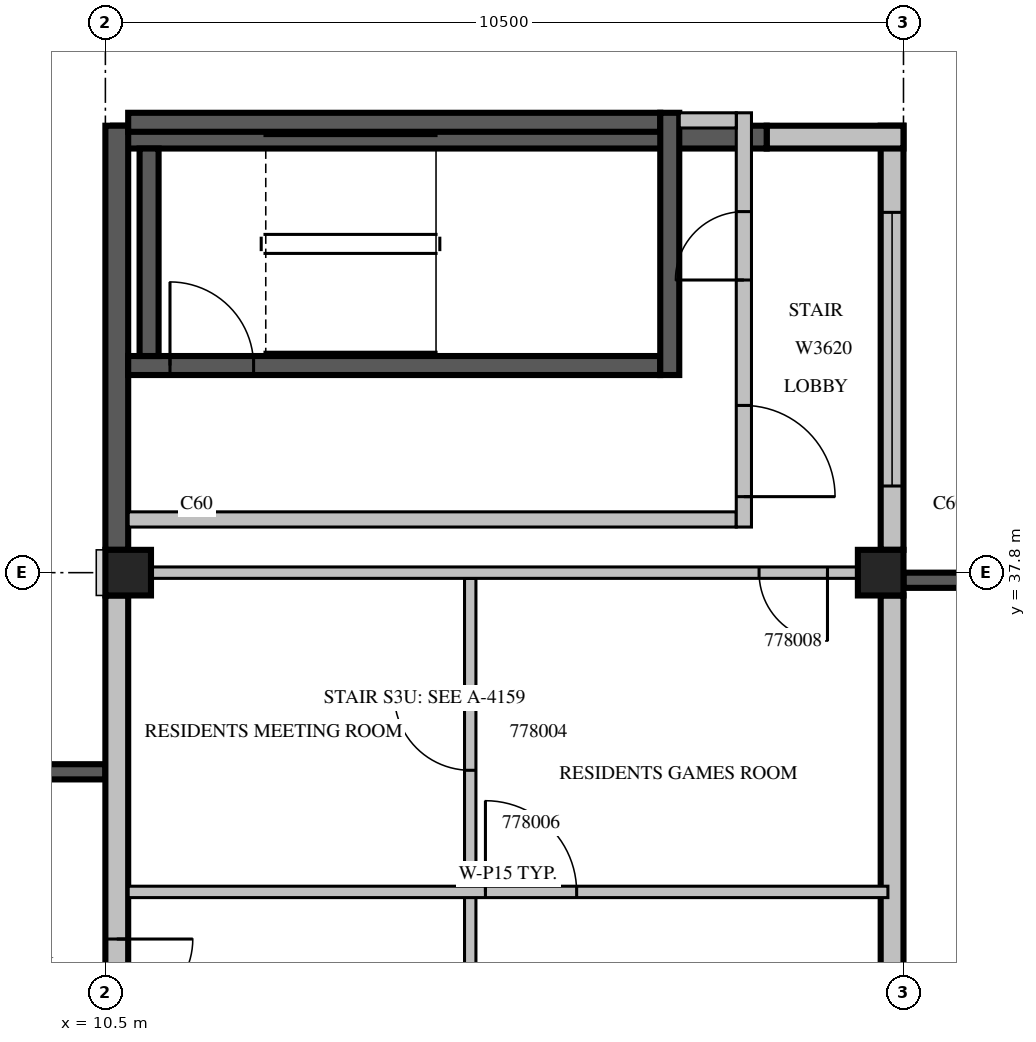
"""IFC4 building model, lengths in metres.
Left out: names, types, materials, properties, quantities, classifications, styles, units other than length and angle.
Written with IfcOpenShell. Run it as: python <this file> out.ifc"""

import sys

from ifc_helpers import new_model, si_unit, direction, frame, frame_2d, origin, origin_2d, place, context, subcontext, project, spatial, rectangle, extrude, source, transform, mapped, element, fill, save


model = new_model("IFC4")
c1 = context("Model", 3, precision=1e-05, world=origin(), true_north=direction((0.0, 1.0)))
c2 = subcontext(c1, "Body", "Model", "MODEL_VIEW")
j1 = project(units=[si_unit("LENGTHUNIT", "METRE"), si_unit("PLANEANGLEUNIT", "RADIAN")], contexts=[c1])
p1 = place(None, origin())
s1 = spatial("IfcSite", under=j1, at=p1, CompositionType="ELEMENT")
p2 = place(p1, origin())
s2 = spatial("IfcBuilding", under=s1, at=p2, CompositionType="ELEMENT")
p3 = place(p2, frame((0.0, 0.0, 333.5)))
s3 = spatial("IfcBuildingStorey", under=s2, at=p3, CompositionType="ELEMENT", Elevation=333.5)
m1 = source(origin(), c2, "Body", "SweptSolid", [
    extrude(rectangle(XDim=0.6, YDim=0.6, at=origin_2d()), origin(), (0.0, 0.0, 1.0), 3.5),
])
for number, where, z_axis, x_axis in (
    (1, (10.8, 37.8, 0.0), (0.0, 0.0, 1.0), (1.0, 0.0, 0.0)),
    (2, (20.7, 37.8, 0.0), (0.0, 0.0, 1.0), (1.0, 0.0, 0.0)),
):
    element("IfcColumn", number, at=place(p3, frame(where, z_axis=z_axis, x_axis=x_axis)), inside=s3, PredefinedType="COLUMN", context=c2, shape_type="MappedRepresentation", body=[
        mapped(m1, transform((0.0, 0.0, 0.0), scale=1.0)),
    ])
m2 = source(origin(), c2, "Body", "SweptSolid", [
    extrude(rectangle(XDim=3.9, YDim=0.2, at=frame_2d((1.95, 0.0))), origin(), (0.0, 0.0, 1.0), 3.1),
])
p4 = place(p3, frame((21.0, 37.7, 0.0), z_axis=(0.0, 0.0, 1.0), x_axis=(1.0, 0.0, 0.0)))
e3 = element("IfcWall", 3, at=p4, inside=s3, PredefinedType="SOLIDWALL", context=c2, shape_type="MappedRepresentation", body=[
    mapped(m2, transform((0.0, 0.0, 0.0), scale=1.0)),
])
m3 = source(origin(), c2, "Body", "SweptSolid", [
    extrude(rectangle(XDim=2.4, YDim=2.0, at=frame_2d((1.2, 1.0))), frame((0.0, 0.11, 0.0), z_axis=(0.0, -1.0, 0.0), x_axis=(1.0, 0.0, 0.0)), (0.0, 0.0, 1.0), 0.22),
])
p5 = place(p4, frame((0.75, 0.0, 0.6)))
e4 = element("IfcOpeningElement", 4, at=p5, cuts=e3, PredefinedType="OPENING", context=c2, shape_type="MappedRepresentation", body=[
    mapped(m3, transform((0.0, 0.0, 0.0), scale=1.0)),
])
p6 = place(p3, frame((10.5, 35.18, 0.0), z_axis=(0.0, 0.0, 1.0), x_axis=(-1.0, 0.0, 0.0)))
e5 = element("IfcWall", 5, at=p6, inside=s3, PredefinedType="SOLIDWALL", context=c2, shape_type="MappedRepresentation", body=[
    mapped(m2, transform((0.0, 0.0, 0.0), scale=1.0)),
])
p7 = place(p6, frame((0.75, 0.0, 0.6)))
e6 = element("IfcOpeningElement", 6, at=p7, cuts=e5, PredefinedType="OPENING", context=c2, shape_type="MappedRepresentation", body=[
    mapped(m3, transform((0.0, 0.0, 0.0), scale=1.0)),
])
m4 = source(origin(), c2, "Body", "SweptSolid", [
    extrude(rectangle(XDim=7.8, YDim=0.3, at=frame_2d((3.9, 0.0))), origin(), (0.0, 0.0, 1.0), 3.1),
])
p8 = place(p3, frame((20.85, 29.7, 0.0), z_axis=(0.0, 0.0, 1.0), x_axis=(0.0, 1.0, 0.0)))
e7 = element("IfcWall", 7, at=p8, inside=s3, PredefinedType="STANDARD", context=c2, shape_type="MappedRepresentation", body=[
    mapped(m4, transform((0.0, 0.0, 0.0), scale=1.0)),
])
m5 = source(origin(), c2, "Body", "SweptSolid", [
    extrude(rectangle(XDim=1.0, YDim=2.1, at=frame_2d((0.5, 1.05))), frame((0.0, 0.16, 0.0), z_axis=(0.0, -1.0, 0.0), x_axis=(1.0, 0.0, 0.0)), (0.0, 0.0, 1.0), 0.32),
])
p9 = place(p8, frame((1.767, 0.0, 0.0)))
e8 = element("IfcOpeningElement", 8, at=p9, cuts=e7, PredefinedType="OPENING", context=c2, shape_type="MappedRepresentation", body=[
    mapped(m5, transform((0.0, 0.0, 0.0), scale=1.0)),
])
m6 = source(origin(), c2, "Body", "SweptSolid", [
    extrude(rectangle(XDim=5.58, YDim=0.3, at=frame_2d((2.79, 0.0))), origin(), (0.0, 0.0, 1.0), 3.1),
])
p10 = place(p3, frame((20.85, 38.1, 0.0), z_axis=(0.0, 0.0, 1.0), x_axis=(0.0, 1.0, 0.0)))
e9 = element("IfcWall", 9, at=p10, inside=s3, PredefinedType="STANDARD", context=c2, shape_type="MappedRepresentation", body=[
    mapped(m6, transform((0.0, 0.0, 0.0), scale=1.0)),
])
m7 = source(origin(), c2, "Body", "SweptSolid", [
    extrude(rectangle(XDim=3.6, YDim=2.0, at=frame_2d((1.8, 1.0))), frame((0.0, 0.16, 0.0), z_axis=(0.0, -1.0, 0.0), x_axis=(1.0, 0.0, 0.0)), (0.0, 0.0, 1.0), 0.32),
])
p11 = place(p10, frame((0.84, 0.0, 0.6)))
e10 = element("IfcOpeningElement", 10, at=p11, cuts=e9, PredefinedType="OPENING", context=c2, shape_type="MappedRepresentation", body=[
    mapped(m7, transform((0.0, 0.0, 0.0), scale=1.0)),
])
m8 = source(origin(), c2, "Body", "SweptSolid", [
    extrude(rectangle(XDim=1.8, YDim=0.3, at=frame_2d((0.9, 0.0))), origin(), (0.0, 0.0, 1.0), 3.1),
])
p12 = place(p3, frame((21.0, 43.53, 0.0), z_axis=(0.0, 0.0, 1.0), x_axis=(-1.0, 0.0, 0.0)))
e11 = element("IfcWall", 11, at=p12, inside=s3, PredefinedType="STANDARD", context=c2, shape_type="MappedRepresentation", body=[
    mapped(m8, transform((0.0, 0.0, 0.0), scale=1.0)),
])
m9 = source(origin(), c2, "Body", "SweptSolid", [
    extrude(rectangle(XDim=8.6, YDim=0.3, at=frame_2d((4.3, 0.0))), origin(), (0.0, 0.0, 1.0), 3.1),
])
p13 = place(p3, frame((19.2, 43.53, 0.0), z_axis=(0.0, 0.0, 1.0), x_axis=(-1.0, 0.0, 0.0)))
e12 = element("IfcWall", 12, at=p13, inside=s3, PredefinedType="SOLIDWALL", context=c2, shape_type="MappedRepresentation", body=[
    mapped(m9, transform((0.0, 0.0, 0.0), scale=1.0)),
])
m10 = source(origin(), c2, "Body", "SweptSolid", [
    extrude(rectangle(XDim=5.58, YDim=0.3, at=frame_2d((2.79, 0.0))), origin(), (0.0, 0.0, 1.0), 3.1),
])
p14 = place(p3, frame((10.65, 43.68, 0.0), z_axis=(0.0, 0.0, 1.0), x_axis=(0.0, -1.0, 0.0)))
e13 = element("IfcWall", 13, at=p14, inside=s3, PredefinedType="SOLIDWALL", context=c2, shape_type="MappedRepresentation", body=[
    mapped(m10, transform((0.0, 0.0, 0.0), scale=1.0)),
])
p15 = place(p3, frame((10.65, 37.5, 0.0), z_axis=(0.0, 0.0, 1.0), x_axis=(0.0, -1.0, 0.0)))
e14 = element("IfcWall", 14, at=p15, inside=s3, PredefinedType="STANDARD", context=c2, shape_type="MappedRepresentation", body=[
    mapped(m4, transform((0.0, 0.0, 0.0), scale=1.0)),
])
p16 = place(p15, frame((4.52, 0.0, 0.0)))
e15 = element("IfcOpeningElement", 15, at=p16, cuts=e14, PredefinedType="OPENING", context=c2, shape_type="MappedRepresentation", body=[
    mapped(m5, transform((0.0, 0.0, 0.0), scale=1.0)),
])
m11 = source(origin(), c2, "Body", "SweptSolid", [
    extrude(rectangle(XDim=7.0, YDim=0.25, at=frame_2d((3.5, 0.0))), origin(), (0.0, 0.0, 1.0), 3.1),
])
p17 = place(p3, frame((10.8, 40.525, 0.0), z_axis=(0.0, 0.0, 1.0), x_axis=(1.0, 0.0, 0.0)))
e16 = element("IfcWall", 16, at=p17, inside=s3, PredefinedType="SOLIDWALL", context=c2, shape_type="MappedRepresentation", body=[
    mapped(m11, transform((0.0, 0.0, 0.0), scale=1.0)),
])
m12 = source(origin(), c2, "Body", "SweptSolid", [
    extrude(rectangle(XDim=1.1, YDim=2.1, at=frame_2d((0.55, 1.05))), frame((0.0, 0.135, 0.0), z_axis=(0.0, -1.0, 0.0), x_axis=(1.0, 0.0, 0.0)), (0.0, 0.0, 1.0), 0.27),
])
p18 = place(p17, frame((0.55, 0.0, 0.0)))
e17 = element("IfcOpeningElement", 17, at=p18, cuts=e16, PredefinedType="OPENING", context=c2, shape_type="MappedRepresentation", body=[
    mapped(m12, transform((0.0, 0.0, 0.0), scale=1.0)),
])
p19 = place(p3, frame((10.8, 43.725, 0.0), z_axis=(0.0, 0.0, 1.0), x_axis=(1.0, 0.0, 0.0)))
e18 = element("IfcWall", 18, at=p19, inside=s3, PredefinedType="SOLIDWALL", context=c2, shape_type="MappedRepresentation", body=[
    mapped(m11, transform((0.0, 0.0, 0.0), scale=1.0)),
])
m13 = source(origin(), c2, "Body", "SweptSolid", [
    extrude(rectangle(XDim=3.45, YDim=0.25, at=frame_2d((1.725, 0.0))), origin(), (0.0, 0.0, 1.0), 3.1),
])
p20 = place(p3, frame((17.925, 40.4, 0.0), z_axis=(0.0, 0.0, 1.0), x_axis=(0.0, 1.0, 0.0)))
e19 = element("IfcWall", 19, at=p20, inside=s3, PredefinedType="SOLIDWALL", context=c2, shape_type="MappedRepresentation", body=[
    mapped(m13, transform((0.0, 0.0, 0.0), scale=1.0)),
])
m14 = source(origin(), c2, "Body", "SweptSolid", [
    extrude(rectangle(XDim=2.73, YDim=0.25, at=frame_2d((1.365, 0.0))), origin(), (0.0, 0.0, 1.0), 3.1),
])
p21 = place(p3, frame((11.075, 40.65, 0.0), z_axis=(0.0, 0.0, 1.0), x_axis=(0.0, 1.0, 0.0)))
e20 = element("IfcWall", 20, at=p21, inside=s3, PredefinedType="SOLIDWALL", context=c2, shape_type="MappedRepresentation", body=[
    mapped(m14, transform((0.0, 0.0, 0.0), scale=1.0)),
])
m15 = source(origin(), c2, "Body", "SweptSolid", [
    extrude(rectangle(XDim=8.0, YDim=0.2, at=frame_2d((4.0, 0.0))), origin(), (0.0, 0.0, 1.0), 3.1),
])
p22 = place(p3, frame((10.8, 38.5, 0.0), z_axis=(0.0, 0.0, 1.0), x_axis=(1.0, 0.0, 0.0)))
e21 = element("IfcWall", 21, at=p22, inside=s3, PredefinedType="PARTITIONING", context=c2, shape_type="MappedRepresentation", body=[
    mapped(m15, transform((0.0, 0.0, 0.0), scale=1.0)),
])
m16 = source(origin(), c2, "Body", "SweptSolid", [
    extrude(rectangle(XDim=5.45, YDim=0.2, at=frame_2d((2.725, 0.0))), origin(), (0.0, 0.0, 1.0), 3.1),
])
p23 = place(p3, frame((18.9, 38.4, 0.0), z_axis=(0.0, 0.0, 1.0), x_axis=(0.0, 1.0, 0.0)))
e22 = element("IfcWall", 22, at=p23, inside=s3, PredefinedType="PARTITIONING", context=c2, shape_type="MappedRepresentation", body=[
    mapped(m16, transform((0.0, 0.0, 0.0), scale=1.0)),
])
m17 = source(origin(), c2, "Body", "SweptSolid", [
    extrude(rectangle(XDim=1.2, YDim=2.1, at=frame_2d((0.6, 1.05))), frame((0.0, 0.11, 0.0), z_axis=(0.0, -1.0, 0.0), x_axis=(1.0, 0.0, 0.0)), (0.0, 0.0, 1.0), 0.22),
])
p24 = place(p23, frame((0.4, 0.0, 0.0)))
e23 = element("IfcOpeningElement", 23, at=p24, cuts=e22, PredefinedType="OPENING", context=c2, shape_type="MappedRepresentation", body=[
    mapped(m17, transform((0.0, 0.0, 0.0), scale=1.0)),
])
m18 = source(origin(), c2, "Body", "SweptSolid", [
    extrude(rectangle(XDim=0.9, YDim=2.1, at=frame_2d((0.45, 1.05))), frame((0.0, 0.11, 0.0), z_axis=(0.0, -1.0, 0.0), x_axis=(1.0, 0.0, 0.0)), (0.0, 0.0, 1.0), 0.22),
])
p25 = place(p23, frame((3.25, 0.0, 0.0)))
e24 = element("IfcOpeningElement", 24, at=p25, cuts=e22, PredefinedType="OPENING", context=c2, shape_type="MappedRepresentation", body=[
    mapped(m18, transform((0.0, 0.0, 0.0), scale=1.0)),
])
m19 = source(origin(), c2, "Body", "SweptSolid", [
    extrude(rectangle(XDim=0.75, YDim=0.2, at=frame_2d((0.375, 0.0))), origin(), (0.0, 0.0, 1.0), 3.1),
])
p26 = place(p3, frame((18.05, 43.75, 0.0), z_axis=(0.0, 0.0, 1.0), x_axis=(1.0, 0.0, 0.0)))
e25 = element("IfcWall", 25, at=p26, inside=s3, PredefinedType="PARTITIONING", context=c2, shape_type="MappedRepresentation", body=[
    mapped(m19, transform((0.0, 0.0, 0.0), scale=1.0)),
])
p27 = place(p3, frame((15.3, 33.6, 0.0), z_axis=(0.0, 0.0, 1.0), x_axis=(0.0, -1.0, 0.0)))
e26 = element("IfcWall", 26, at=p27, inside=s3, PredefinedType="PARTITIONING", context=c2, shape_type="SweptSolid", body=[
    extrude(rectangle(XDim=4.2, YDim=0.15, at=frame_2d((2.1, 0.0))), origin(), (0.0, 0.0, 1.0), 3.1),
])
m20 = source(origin(), c2, "Body", "SweptSolid", [
    extrude(rectangle(XDim=1.0, YDim=2.1, at=frame_2d((0.5, 1.05))), frame((0.0, 0.085, 0.0), z_axis=(0.0, -1.0, 0.0), x_axis=(1.0, 0.0, 0.0)), (0.0, 0.0, 1.0), 0.17),
])
p28 = place(p27, frame((1.6, 0.0, 0.0)))
e27 = element("IfcOpeningElement", 27, at=p28, cuts=e26, PredefinedType="OPENING", context=c2, shape_type="MappedRepresentation", body=[
    mapped(m20, transform((0.0, 0.0, 0.0), scale=1.0)),
])
p29 = place(p3, frame((15.3, 37.725, 0.0), z_axis=(0.0, 0.0, 1.0), x_axis=(0.0, -1.0, 0.0)))
e28 = element("IfcWall", 28, at=p29, inside=s3, PredefinedType="PARTITIONING", context=c2, shape_type="SweptSolid", body=[
    extrude(rectangle(XDim=4.105, YDim=0.15, at=frame_2d((2.053, 0.0))), origin(), (0.0, 0.0, 1.0), 3.1),
])
p30 = place(p29, frame((1.525, 0.0, 0.0)))
e29 = element("IfcOpeningElement", 29, at=p30, cuts=e28, PredefinedType="OPENING", context=c2, shape_type="MappedRepresentation", body=[
    mapped(m20, transform((0.0, 0.0, 0.0), scale=1.0)),
])
p31 = place(p3, frame((10.8, 33.6, 0.0), z_axis=(0.0, 0.0, 1.0), x_axis=(1.0, 0.0, 0.0)))
e30 = element("IfcWall", 30, at=p31, inside=s3, PredefinedType="PARTITIONING", context=c2, shape_type="SweptSolid", body=[
    extrude(rectangle(XDim=9.995, YDim=0.15, at=frame_2d((4.997, 0.0))), origin(), (0.0, 0.0, 1.0), 3.1),
])
m21 = source(origin(), c2, "Body", "SweptSolid", [
    extrude(rectangle(XDim=1.2, YDim=2.1, at=frame_2d((0.6, 1.05))), frame((0.0, 0.085, 0.0), z_axis=(0.0, -1.0, 0.0), x_axis=(1.0, 0.0, 0.0)), (0.0, 0.0, 1.0), 0.17),
])
p32 = place(p31, frame((4.7, 0.0, 0.0)))
e31 = element("IfcOpeningElement", 31, at=p32, cuts=e30, PredefinedType="OPENING", context=c2, shape_type="MappedRepresentation", body=[
    mapped(m21, transform((0.0, 0.0, 0.0), scale=1.0)),
])
m22 = source(origin(), c2, "Body", "SweptSolid", [
    extrude(rectangle(XDim=9.302, YDim=0.15, at=frame_2d((4.651, 0.0))), origin(), (0.0, 0.0, 1.0), 3.1),
])
p33 = place(p3, frame((20.401, 37.8, 0.0), z_axis=(0.0, 0.0, 1.0), x_axis=(-1.0, 0.0, 0.0)))
e32 = element("IfcWall", 32, at=p33, inside=s3, PredefinedType="PARTITIONING", context=c2, shape_type="MappedRepresentation", body=[
    mapped(m22, transform((0.0, 0.0, 0.0), scale=1.0)),
])
m23 = source(origin(), c2, "Body", "SweptSolid", [
    extrude(rectangle(XDim=0.9, YDim=2.1, at=frame_2d((0.45, 1.05))), frame((0.0, 0.085, 0.0), z_axis=(0.0, -1.0, 0.0), x_axis=(1.0, 0.0, 0.0)), (0.0, 0.0, 1.0), 0.17),
])
p34 = place(p33, frame((0.401, 0.0, 0.0)))
e33 = element("IfcOpeningElement", 33, at=p34, cuts=e32, PredefinedType="OPENING", context=c2, shape_type="MappedRepresentation", body=[
    mapped(m23, transform((0.0, 0.0, 0.0), scale=1.0)),
])
m24 = source(origin(), c2, "Body", "SweptSolid", [
    extrude(rectangle(XDim=3.6, YDim=2.0, at=frame_2d((1.8, 1.0))), frame((0.0, 0.03, 0.0), z_axis=(0.0, -1.0, 0.0), x_axis=(1.0, 0.0, 0.0)), (0.0, 0.0, 1.0), 0.06),
])
p35 = place(p11, origin())
e34 = element("IfcWindow", 34, at=p35, inside=s3, PartitioningType="SINGLE_PANEL", PredefinedType="WINDOW", context=c2, shape_type="MappedRepresentation", body=[
    mapped(m24, transform((0.0, 0.0, 0.0), scale=1.0)),
])
fill(e10, e34)
m25 = source(origin(), c2, "Body", "SweptSolid", [
    extrude(rectangle(XDim=1.1, YDim=2.1, at=frame_2d((0.55, 1.05))), frame((0.0, 0.025, 0.0), z_axis=(0.0, -1.0, 0.0), x_axis=(1.0, 0.0, 0.0)), (0.0, 0.0, 1.0), 0.05),
])
p36 = place(p18, origin())
e35 = element("IfcDoor", 35, at=p36, inside=s3, OperationType="SINGLE_SWING_LEFT", PredefinedType="DOOR", context=c2, shape_type="MappedRepresentation", body=[
    mapped(m25, transform((0.0, 0.0, 0.0), scale=1.0)),
])
fill(e17, e35)
m26 = source(origin(), c2, "Body", "SweptSolid", [
    extrude(rectangle(XDim=1.2, YDim=2.1, at=frame_2d((0.6, 1.05))), frame((0.0, 0.025, 0.0), z_axis=(0.0, -1.0, 0.0), x_axis=(1.0, 0.0, 0.0)), (0.0, 0.0, 1.0), 0.05),
])
p37 = place(p24, origin())
e36 = element("IfcDoor", 36, at=p37, inside=s3, OperationType="SINGLE_SWING_RIGHT", PredefinedType="DOOR", context=c2, shape_type="MappedRepresentation", body=[
    mapped(m26, transform((0.0, 0.0, 0.0), scale=1.0)),
])
fill(e23, e36)
m27 = source(origin(), c2, "Body", "SweptSolid", [
    extrude(rectangle(XDim=0.9, YDim=2.1, at=frame_2d((0.45, 1.05))), frame((0.0, 0.025, 0.0), z_axis=(0.0, -1.0, 0.0), x_axis=(1.0, 0.0, 0.0)), (0.0, 0.0, 1.0), 0.05),
])
p38 = place(p25, origin())
e37 = element("IfcDoor", 37, at=p38, inside=s3, OperationType="SINGLE_SWING_LEFT", PredefinedType="DOOR", context=c2, shape_type="MappedRepresentation", body=[
    mapped(m27, transform((0.0, 0.0, 0.0), scale=1.0)),
])
fill(e24, e37)
m28 = source(origin(), c2, "Body", "SweptSolid", [
    extrude(rectangle(XDim=1.0, YDim=2.1, at=frame_2d((0.5, 1.05))), frame((0.0, 0.025, 0.0), z_axis=(0.0, -1.0, 0.0), x_axis=(1.0, 0.0, 0.0)), (0.0, 0.0, 1.0), 0.05),
])
p39 = place(p30, origin())
e38 = element("IfcDoor", 38, at=p39, inside=s3, OperationType="SINGLE_SWING_RIGHT", PredefinedType="DOOR", context=c2, shape_type="MappedRepresentation", body=[
    mapped(m28, transform((0.0, 0.0, 0.0), scale=1.0)),
])
fill(e29, e38)
p40 = place(p32, origin())
e39 = element("IfcDoor", 39, at=p40, inside=s3, OperationType="SINGLE_SWING_LEFT", PredefinedType="DOOR", context=c2, shape_type="MappedRepresentation", body=[
    mapped(m26, transform((0.0, 0.0, 0.0), scale=1.0)),
])
fill(e31, e39)
p41 = place(p34, origin())
e40 = element("IfcDoor", 40, at=p41, inside=s3, OperationType="SINGLE_SWING_LEFT", PredefinedType="DOOR", context=c2, shape_type="MappedRepresentation", body=[
    mapped(m27, transform((0.0, 0.0, 0.0), scale=1.0)),
])
fill(e33, e40)
p42 = place(p16, origin())
e41 = element("IfcDoor", 41, at=p42, inside=s3, OperationType="SINGLE_SWING_LEFT", PredefinedType="DOOR", context=c2, shape_type="MappedRepresentation", body=[
    mapped(m28, transform((0.0, 0.0, 0.0), scale=1.0)),
])
fill(e15, e41)
save(model, sys.argv[1])
